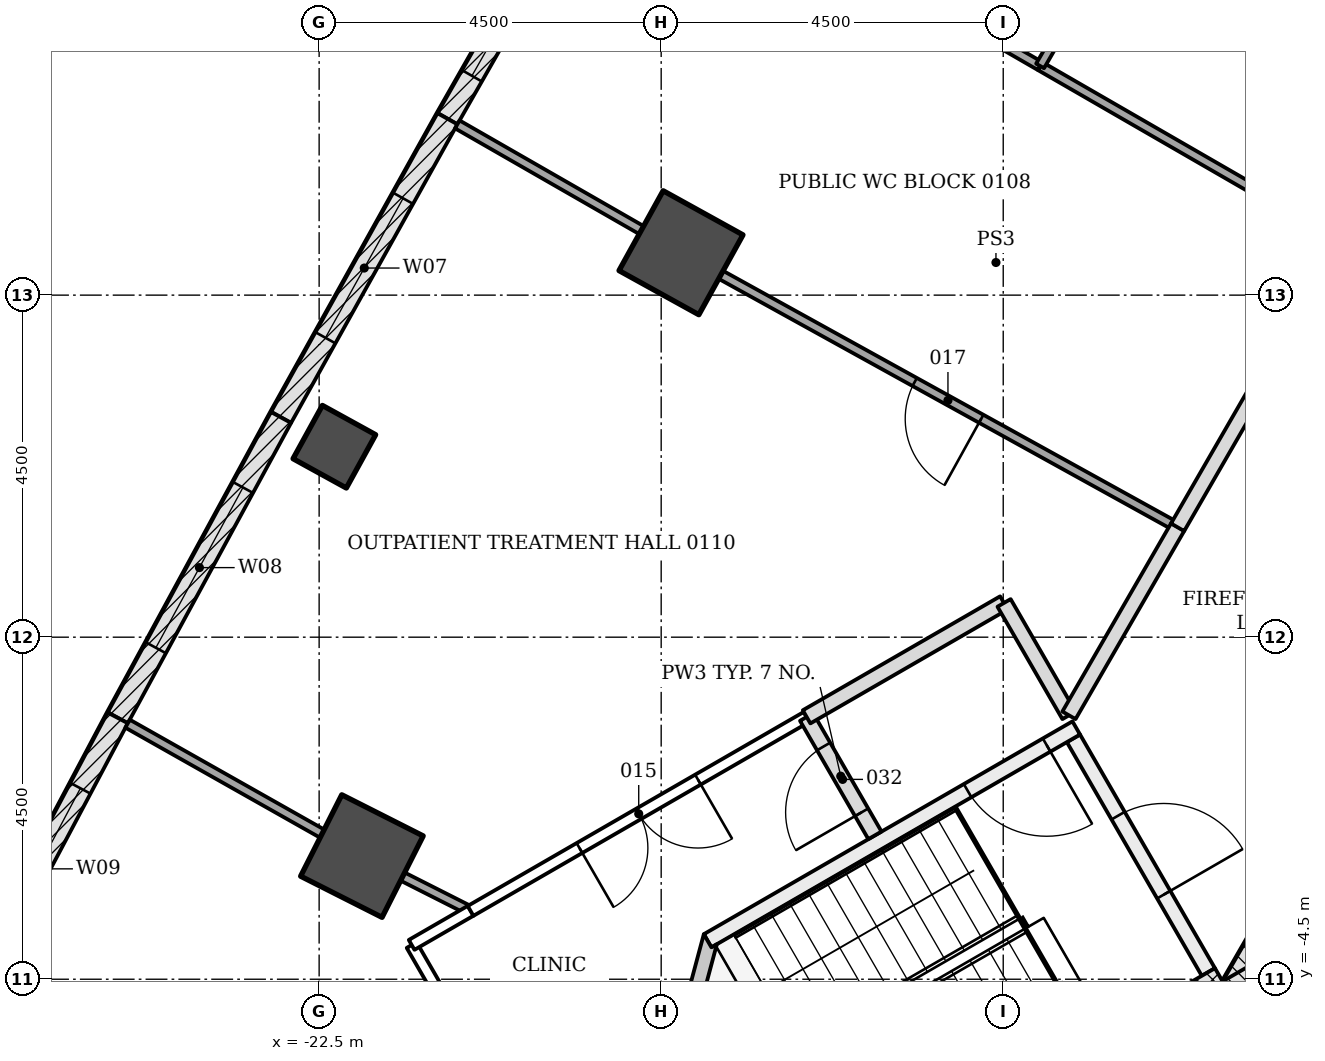
"""IFC4 building model, lengths in metres.
Left out: names, types, materials, properties, quantities, classifications, styles, units other than length and angle.
Written with IfcOpenShell. Run it as: python <this file> out.ifc"""

import sys

from ifc_helpers import new_model, si_unit, direction, frame, frame_2d, origin, origin_2d, place, context, subcontext, project, spatial, polyline, rectangle, outline, extrude, element, fill, save


model = new_model("IFC4")
c1 = context("Model", 3, precision=1e-05, world=origin(), true_north=direction((0.0, 1.0)))
c2 = subcontext(c1, "Body", "Model", "MODEL_VIEW")
j1 = project(units=[si_unit("LENGTHUNIT", "METRE"), si_unit("PLANEANGLEUNIT", "RADIAN")], contexts=[c1])
p1 = place(None, origin())
s1 = spatial("IfcSite", under=j1, at=p1, CompositionType="ELEMENT")
p2 = place(p1, origin())
s2 = spatial("IfcBuilding", under=s1, at=p2, CompositionType="ELEMENT")
p3 = place(p2, frame((0.0, 0.0, 6.0)))
s3 = spatial("IfcBuildingStorey", under=s2, at=p3, CompositionType="ELEMENT", Elevation=6.0)
for number, where, z_axis, x_axis in (
    (1, (-17.739, 5.058, -0.25), (0.0, 0.0, 1.0), (-0.875, 0.484, 0.0)),
    (2, (-21.937, -2.88, -0.25), (0.0, 0.0, 1.0), (-0.893, 0.451, 0.0)),
):
    element("IfcColumn", number, at=place(p3, frame(where, z_axis=z_axis, x_axis=x_axis)), inside=s3, PredefinedType="COLUMN", context=c2, shape_type="SweptSolid", body=[
        extrude(rectangle(XDim=1.2, YDim=1.2, at=origin_2d()), origin(), (0.0, 0.0, 1.0), 4.5),
    ])
p4 = place(p3, frame((-22.3, 2.506, -0.25), z_axis=(0.0, 0.0, 1.0), x_axis=(-0.87611131274, 0.482108875348, 0.0)))
e3 = element("IfcColumn", 3, at=p4, inside=s3, PredefinedType="COLUMN", context=c2, shape_type="SweptSolid", body=[
    extrude(rectangle(XDim=0.8, YDim=0.8, at=origin_2d()), origin(), (0.0, 0.0, 1.0), 4.5),
])
p5 = place(p3, frame((-1.083, 11.281, -0.25), z_axis=(0.0, 0.0, 1.0), x_axis=(-0.500001446645, -0.866024568562, 0.0)))
e4 = element("IfcWall", 4, at=p5, inside=s3, PredefinedType="SHEAR", context=c2, shape_type="SweptSolid", body=[
    extrude(rectangle(XDim=18.458, YDim=0.7, at=frame_2d((9.229, 0.0))), origin(), (0.0, 0.0, 1.0), 4.5),
])
p6 = place(p5, frame((8.979, 0.0, 0.25)))
e5 = element("IfcOpeningElement", 5, at=p6, cuts=e4, PredefinedType="OPENING", context=c2, shape_type="SweptSolid", body=[
    extrude(rectangle(XDim=1.2, YDim=2.1, at=frame_2d((0.6, 1.05))), frame((0.0, 0.36, 0.0), z_axis=(0.0, -1.0, 0.0), x_axis=(1.0, 0.0, 0.0)), (0.0, 0.0, 1.0), 0.72),
])
p7 = place(p5, frame((11.029, 0.0, 0.25)))
e6 = element("IfcOpeningElement", 6, at=p7, cuts=e4, PredefinedType="OPENING", context=c2, shape_type="SweptSolid", body=[
    extrude(rectangle(XDim=1.2, YDim=2.1, at=frame_2d((0.6, 1.05))), frame((0.0, 0.36, 0.0), z_axis=(0.0, -1.0, 0.0), x_axis=(1.0, 0.0, 0.0)), (0.0, 0.0, 1.0), 0.72),
])
p8 = place(p3, frame((-10.311, -4.353, -0.25), z_axis=(0.0, 0.0, 1.0), x_axis=(0.500042739161, -0.866000726912, 0.0)))
e7 = element("IfcWall", 7, at=p8, inside=s3, PredefinedType="SHEAR", context=c2, shape_type="SweptSolid", body=[
    extrude(rectangle(XDim=2.771, YDim=0.7, at=frame_2d((1.386, 0.0))), origin(), (0.0, 0.0, 1.0), 4.5),
])
p9 = place(p3, frame((-20.811, 6.823, 0.0), z_axis=(0.0, 0.0, 1.0), x_axis=(0.495524760411, 0.868593812907, 0.0)))
e8 = element("IfcWall", 8, at=p9, inside=s3, PredefinedType="NOTDEFINED", context=c2, shape_type="SweptSolid", body=[
    extrude(rectangle(XDim=4.496, YDim=0.3, at=frame_2d((2.248, 0.0))), origin(), (0.0, 0.0, 1.0), 4.25),
])
p10 = place(p9, frame((0.648, 0.0, 0.8)))
e9 = element("IfcOpeningElement", 9, at=p10, cuts=e8, PredefinedType="OPENING", context=c2, shape_type="SweptSolid", body=[
    extrude(rectangle(XDim=3.2, YDim=2.7, at=frame_2d((1.6, 1.35))), frame((0.0, 0.16, 0.0), z_axis=(0.0, -1.0, 0.0), x_axis=(1.0, 0.0, 0.0)), (0.0, 0.0, 1.0), 0.32),
])
p11 = place(p3, frame((-23.0, 2.893, 0.0), z_axis=(0.0, 0.0, 1.0), x_axis=(0.486606252415, 0.873621402617, 0.0)))
e10 = element("IfcWall", 10, at=p11, inside=s3, PredefinedType="NOTDEFINED", context=c2, shape_type="SweptSolid", body=[
    extrude(rectangle(XDim=4.496, YDim=0.3, at=frame_2d((2.248, 0.0))), origin(), (0.0, 0.0, 1.0), 4.25),
])
p12 = place(p11, frame((1.198, 0.0, 0.8)))
e11 = element("IfcOpeningElement", 11, at=p12, cuts=e10, PredefinedType="OPENING", context=c2, shape_type="SweptSolid", body=[
    extrude(rectangle(XDim=2.1, YDim=3.0, at=frame_2d((1.05, 1.5))), frame((0.0, 0.16, 0.0), z_axis=(0.0, -1.0, 0.0), x_axis=(1.0, 0.0, 0.0)), (0.0, 0.0, 1.0), 0.32),
])
p13 = place(p3, frame((-25.148, -1.06, 0.0), z_axis=(0.0, 0.0, 1.0), x_axis=(0.477577109439, 0.878589838628, 0.0)))
e12 = element("IfcWall", 12, at=p13, inside=s3, PredefinedType="NOTDEFINED", context=c2, shape_type="SweptSolid", body=[
    extrude(rectangle(XDim=4.496, YDim=0.3, at=frame_2d((2.248, 0.0))), origin(), (0.0, 0.0, 1.0), 4.25),
])
p14 = place(p13, frame((1.048, 0.0, 0.9)))
e13 = element("IfcOpeningElement", 13, at=p14, cuts=e12, PredefinedType="OPENING", context=c2, shape_type="SweptSolid", body=[
    extrude(rectangle(XDim=2.4, YDim=2.4, at=frame_2d((1.2, 1.2))), frame((0.0, 0.16, 0.0), z_axis=(0.0, -1.0, 0.0), x_axis=(1.0, 0.0, 0.0)), (0.0, 0.0, 1.0), 0.32),
])
p15 = place(p3, frame((-27.256, -5.034, 0.0), z_axis=(0.0, 0.0, 1.0), x_axis=(0.468566202388, 0.883428386447, 0.0)))
e14 = element("IfcWall", 14, at=p15, inside=s3, PredefinedType="NOTDEFINED", context=c2, shape_type="SweptSolid", body=[
    extrude(rectangle(XDim=4.496, YDim=0.3, at=frame_2d((2.248, 0.0))), origin(), (0.0, 0.0, 1.0), 4.25),
])
p16 = place(p15, frame((1.048, 0.0, 0.9)))
e15 = element("IfcOpeningElement", 15, at=p16, cuts=e14, PredefinedType="OPENING", context=c2, shape_type="SweptSolid", body=[
    extrude(rectangle(XDim=2.4, YDim=2.4, at=frame_2d((1.2, 1.2))), frame((0.0, 0.16, 0.0), z_axis=(0.0, -1.0, 0.0), x_axis=(1.0, 0.0, 0.0)), (0.0, 0.0, 1.0), 0.32),
])
p17 = place(p3, frame((-12.576, -1.331, -0.25), z_axis=(0.0, 0.0, 1.0), x_axis=(0.499970499736, -0.8660424351, 0.0)))
e16 = element("IfcWall", 16, at=p17, inside=s3, PredefinedType="SHEAR", context=c2, shape_type="SweptSolid", body=[
    extrude(rectangle(XDim=3.55, YDim=0.2, at=frame_2d((1.775, 0.0))), origin(), (0.0, 0.0, 1.0), 4.5),
])
p18 = place(p17, frame((1.175, 0.0, 0.25)))
e17 = element("IfcOpeningElement", 17, at=p18, cuts=e16, PredefinedType="OPENING", context=c2, shape_type="SweptSolid", body=[
    extrude(rectangle(XDim=1.2, YDim=2.1, at=frame_2d((0.6, 1.05))), frame((0.0, 0.11, 0.0), z_axis=(0.0, -1.0, 0.0), x_axis=(1.0, 0.0, 0.0)), (0.0, 0.0, 1.0), 0.22),
])
p19 = place(p3, frame((-12.539, -1.194, -0.25), z_axis=(0.0, 0.0, 1.0), x_axis=(-0.866045472092, -0.499965239061, 0.0)))
e18 = element("IfcWall", 18, at=p19, inside=s3, PredefinedType="SHEAR", context=c2, shape_type="SweptSolid", body=[
    extrude(rectangle(XDim=5.6, YDim=0.2, at=frame_2d((2.8, 0.0))), origin(), (0.0, 0.0, 1.0), 4.5),
])
p20 = place(p19, frame((0.45, 0.0, 0.25)))
e19 = element("IfcOpeningElement", 19, at=p20, cuts=e18, PredefinedType="OPENING", context=c2, shape_type="SweptSolid", body=[
    extrude(rectangle(XDim=1.2, YDim=2.1, at=frame_2d((0.6, 1.05))), frame((0.0, 0.11, 0.0), z_axis=(0.0, -1.0, 0.0), x_axis=(1.0, 0.0, 0.0)), (0.0, 0.0, 1.0), 0.22),
])
p21 = place(p3, frame((-10.43, -4.847, -0.25), z_axis=(0.0, 0.0, 1.0), x_axis=(-0.866018442252, -0.500012057535, 0.0)))
e20 = element("IfcWall", 20, at=p21, inside=s3, PredefinedType="SHEAR", context=c2, shape_type="SweptSolid", body=[
    extrude(rectangle(XDim=7.2, YDim=1.136, at=frame_2d((3.6, 0.0))), origin(), (0.0, 0.0, 1.0), 4.5),
])
p22 = place(p3, frame((0.0, 0.0, -0.25)))
e21 = element("IfcWall", 21, at=p22, inside=s3, PredefinedType="SHEAR", context=c2, shape_type="SweptSolid", body=[
    extrude(outline(polyline([(-17.439, -3.907), (-18.025, -6.093), (-16.95, -7.955), (-16.777, -7.855), (-17.81, -6.065), (-17.267, -4.039), (-17.339, -4.081), (-17.339, -4.081), (-17.339, -4.081), (-17.339, -4.081), (-17.339, -4.081), (-17.339, -4.081), (-17.339, -4.081), (-17.339, -4.081), (-17.339, -4.081), (-17.339, -4.081), (-17.339, -4.081), (-17.339, -4.081), (-17.339, -4.081), (-17.339, -4.081), (-17.339, -4.081), (-17.339, -4.081), (-17.339, -4.081), (-17.439, -3.907)])), origin(), (0.0, 0.0, 1.0), 4.5),
])
p23 = place(p3, frame((-17.941, -9.838, 0.0), z_axis=(0.0, 0.0, 1.0), x_axis=(-0.500048140185, 0.865997608252, 0.0)))
e22 = element("IfcWall", 22, at=p23, inside=s3, PredefinedType="PARTITIONING", context=c2, shape_type="SweptSolid", body=[
    extrude(rectangle(XDim=6.683, YDim=0.15, at=frame_2d((3.342, 0.0))), origin(), (0.0, 0.0, 1.0), 3.638),
])
p24 = place(p23, frame((2.45, 0.0, 0.0)))
e23 = element("IfcOpeningElement", 23, at=p24, cuts=e22, PredefinedType="OPENING", context=c2, shape_type="SweptSolid", body=[
    extrude(rectangle(XDim=1.8, YDim=2.1, at=frame_2d((0.9, 1.05))), frame((0.0, 0.085, 0.0), z_axis=(0.0, -1.0, 0.0), x_axis=(1.0, 0.0, 0.0)), (0.0, 0.0, 1.0), 0.17),
])
p25 = place(p3, frame((-21.283, -4.048, 0.0), z_axis=(0.0, 0.0, 1.0), x_axis=(0.865804825377, 0.500381858538, 0.0)))
e24 = element("IfcWall", 24, at=p25, inside=s3, PredefinedType="PARTITIONING", context=c2, shape_type="SweptSolid", body=[
    extrude(rectangle(XDim=0.897, YDim=0.15, at=frame_2d((0.449, 0.0))), origin(), (0.0, 0.0, 1.0), 3.638),
])
p26 = place(p3, frame((-22.461, -2.584, 0.0), z_axis=(0.0, 0.0, 1.0), x_axis=(-0.870620069476, 0.491955988505, 0.0)))
e25 = element("IfcWall", 25, at=p26, inside=s3, PredefinedType="PARTITIONING", context=c2, shape_type="SweptSolid", body=[
    extrude(rectangle(XDim=2.939, YDim=0.12, at=frame_2d((1.47, 0.0))), origin(), (0.0, 0.0, 1.0), 3.633),
])
p27 = place(p3, frame((-20.509, -3.601, 0.0), z_axis=(0.0, 0.0, 1.0), x_axis=(-0.892316605155, 0.451410097544, 0.0)))
e26 = element("IfcWall", 26, at=p27, inside=s3, PredefinedType="PARTITIONING", context=c2, shape_type="SweptSolid", body=[
    extrude(rectangle(XDim=1.0, YDim=0.12, at=frame_2d((0.5, 0.0))), origin(), (0.0, 0.0, 1.0), 3.638),
])
p28 = place(p3, frame((-16.087, -1.049, 0.0), z_axis=(0.0, 0.0, 1.0), x_axis=(-0.866071706002, -0.49991979363, 0.0)))
e27 = element("IfcWall", 27, at=p28, inside=s3, PredefinedType="PARTITIONING", context=c2, shape_type="SweptSolid", body=[
    extrude(rectangle(XDim=5.105, YDim=0.15, at=frame_2d((2.552, 0.0))), origin(), (0.0, 0.0, 1.0), 3.638),
])
p29 = place(p28, frame((1.65, 0.0, 0.0)))
e28 = element("IfcOpeningElement", 28, at=p29, cuts=e27, PredefinedType="OPENING", context=c2, shape_type="SweptSolid", body=[
    extrude(rectangle(XDim=1.8, YDim=2.1, at=frame_2d((0.9, 1.05))), frame((0.0, 0.085, 0.0), z_axis=(0.0, -1.0, 0.0), x_axis=(1.0, 0.0, 0.0)), (0.0, 0.0, 1.0), 0.17),
])
p30 = place(p3, frame((-15.188, -2.607, 0.0), z_axis=(0.0, 0.0, 1.0), x_axis=(-0.500024172624, 0.866011447264, 0.0)))
e29 = element("IfcWall", 29, at=p30, inside=s3, PredefinedType="PARTITIONING", context=c2, shape_type="SweptSolid", body=[
    extrude(rectangle(XDim=1.798, YDim=0.2, at=frame_2d((0.899, 0.0))), origin(), (0.0, 0.0, 1.0), 3.638),
])
p31 = place(p30, frame((0.35, 0.0, 0.0)))
e30 = element("IfcOpeningElement", 30, at=p31, cuts=e29, PredefinedType="OPENING", context=c2, shape_type="SweptSolid", body=[
    extrude(rectangle(XDim=1.0, YDim=2.1, at=frame_2d((0.5, 1.05))), frame((0.0, 0.11, 0.0), z_axis=(0.0, -1.0, 0.0), x_axis=(1.0, 0.0, 0.0)), (0.0, 0.0, 1.0), 0.22),
])
p32 = place(p3, frame((-16.087, -1.048, 0.0), z_axis=(0.0, 0.0, 1.0), x_axis=(0.865988915629, 0.500063194015, 0.0)))
e31 = element("IfcWall", 31, at=p32, inside=s3, PredefinedType="PARTITIONING", context=c2, shape_type="SweptSolid", body=[
    extrude(rectangle(XDim=2.998, YDim=0.2, at=frame_2d((1.499, 0.0))), origin(), (0.0, 0.0, 1.0), 3.638),
])
p33 = place(p3, frame((-13.489, 0.451, 0.0), z_axis=(0.0, 0.0, 1.0), x_axis=(0.500044178772, -0.865999895656, 0.0)))
e32 = element("IfcWall", 32, at=p33, inside=s3, PredefinedType="PARTITIONING", context=c2, shape_type="SweptSolid", body=[
    extrude(rectangle(XDim=1.708, YDim=0.2, at=frame_2d((0.854, 0.0))), origin(), (0.0, 0.0, 1.0), 4.25),
])
p34 = place(p3, frame((-12.635, -1.028, 0.0), z_axis=(0.0, 0.0, 1.0), x_axis=(0.50005725472, 0.865992345233, 0.0)))
e33 = element("IfcWall", 33, at=p34, inside=s3, PredefinedType="PARTITIONING", context=c2, shape_type="SweptSolid", body=[
    extrude(rectangle(XDim=2.862, YDim=0.2, at=frame_2d((1.431, 0.0))), origin(), (0.0, 0.0, 1.0), 3.638),
])
p35 = place(p3, frame((-18.26, 5.356, 0.0), z_axis=(0.0, 0.0, 1.0), x_axis=(-0.867283853893, 0.49781393791, 0.0)))
e34 = element("IfcWall", 34, at=p35, inside=s3, PredefinedType="PARTITIONING", context=c2, shape_type="SweptSolid", body=[
    extrude(rectangle(XDim=2.792, YDim=0.12, at=frame_2d((1.396, 0.0))), origin(), (0.0, 0.0, 1.0), 3.633),
])
p36 = place(p3, frame((-11.208, 1.446, 0.0), z_axis=(0.0, 0.0, 1.0), x_axis=(-0.875125393946, 0.483896212912, 0.0)))
e35 = element("IfcWall", 35, at=p36, inside=s3, PredefinedType="PARTITIONING", context=c2, shape_type="SweptSolid", body=[
    extrude(rectangle(XDim=6.863, YDim=0.12, at=frame_2d((3.432, 0.0))), origin(), (0.0, 0.0, 1.0), 3.638),
])
p37 = place(p36, frame((2.95, 0.0, 0.0)))
e36 = element("IfcOpeningElement", 36, at=p37, cuts=e35, PredefinedType="OPENING", context=c2, shape_type="SweptSolid", body=[
    extrude(rectangle(XDim=1.0, YDim=2.1, at=frame_2d((0.5, 1.05))), frame((0.0, 0.07, 0.0), z_axis=(0.0, -1.0, 0.0), x_axis=(1.0, 0.0, 0.0)), (0.0, 0.0, 1.0), 0.14),
])
p38 = place(p3, frame((-9.031, 5.213, 0.0), z_axis=(0.0, 0.0, 1.0), x_axis=(-0.500044734646, -0.865999574684, 0.0)))
e37 = element("IfcWall", 37, at=p38, inside=s3, PredefinedType="PARTITIONING", context=c2, shape_type="SweptSolid", body=[
    extrude(rectangle(XDim=4.35, YDim=0.2, at=frame_2d((2.175, 0.0))), origin(), (0.0, 0.0, 1.0), 3.638),
])
p39 = place(p3, frame((-9.032, 5.215, 0.0), z_axis=(0.0, 0.0, 1.0), x_axis=(-0.866130767322, 0.499817460578, 0.0)))
e38 = element("IfcWall", 38, at=p39, inside=s3, PredefinedType="PARTITIONING", context=c2, shape_type="SweptSolid", body=[
    extrude(rectangle(XDim=4.597, YDim=0.12, at=frame_2d((2.299, 0.0))), origin(), (0.0, 0.0, 1.0), 3.638),
])
p40 = place(p3, frame((-13.017, 7.515, 0.0), z_axis=(0.0, 0.0, 1.0), x_axis=(-0.866023771128, 0.500002827834, 0.0)))
e39 = element("IfcWall", 39, at=p40, inside=s3, PredefinedType="PARTITIONING", context=c2, shape_type="SweptSolid", body=[
    extrude(rectangle(XDim=5.226, YDim=0.12, at=frame_2d((2.613, 0.0))), origin(), (0.0, 0.0, 1.0), 3.638),
])
p41 = place(p3, frame((-10.797, 11.355, 0.0), z_axis=(0.0, 0.0, 1.0), x_axis=(-0.500117989508, -0.865957271793, 0.0)))
e40 = element("IfcWall", 40, at=p41, inside=s3, PredefinedType="PARTITIONING", context=c2, shape_type="SweptSolid", body=[
    extrude(rectangle(XDim=4.435, YDim=0.12, at=frame_2d((2.217, 0.0))), origin(), (0.0, 0.0, 1.0), 3.638),
])
p42 = place(p41, frame((1.75, 0.0, 0.0)))
e41 = element("IfcOpeningElement", 41, at=p42, cuts=e40, PredefinedType="OPENING", context=c2, shape_type="SweptSolid", body=[
    extrude(rectangle(XDim=1.0, YDim=2.1, at=frame_2d((0.5, 1.05))), frame((0.0, 0.07, 0.0), z_axis=(0.0, -1.0, 0.0), x_axis=(1.0, 0.0, 0.0)), (0.0, 0.0, 1.0), 0.14),
])
p43 = place(p10, origin())
e42 = element("IfcWindow", 42, at=p43, inside=s3, PartitioningType="TRIPLE_PANEL_VERTICAL", PredefinedType="WINDOW", context=c2, shape_type="SweptSolid", body=[
    extrude(rectangle(XDim=3.2, YDim=2.7, at=frame_2d((1.6, 1.35))), frame((0.0, 0.03, 0.0), z_axis=(0.0, -1.0, 0.0), x_axis=(1.0, 0.0, 0.0)), (0.0, 0.0, 1.0), 0.06),
])
fill(e9, e42)
p44 = place(p12, origin())
e43 = element("IfcWindow", 43, at=p44, inside=s3, PartitioningType="DOUBLE_PANEL_HORIZONTAL", PredefinedType="WINDOW", context=c2, shape_type="SweptSolid", body=[
    extrude(rectangle(XDim=2.1, YDim=3.0, at=frame_2d((1.05, 1.5))), frame((0.0, 0.03, 0.0), z_axis=(0.0, -1.0, 0.0), x_axis=(1.0, 0.0, 0.0)), (0.0, 0.0, 1.0), 0.06),
])
fill(e11, e43)
p45 = place(p14, origin())
e44 = element("IfcWindow", 44, at=p45, inside=s3, PartitioningType="DOUBLE_PANEL_VERTICAL", PredefinedType="WINDOW", context=c2, shape_type="SweptSolid", body=[
    extrude(rectangle(XDim=2.4, YDim=2.4, at=frame_2d((1.2, 1.2))), frame((0.0, 0.03, 0.0), z_axis=(0.0, -1.0, 0.0), x_axis=(1.0, 0.0, 0.0)), (0.0, 0.0, 1.0), 0.06),
])
fill(e13, e44)
p46 = place(p16, origin())
e45 = element("IfcWindow", 45, at=p46, inside=s3, PartitioningType="DOUBLE_PANEL_VERTICAL", PredefinedType="WINDOW", context=c2, shape_type="SweptSolid", body=[
    extrude(rectangle(XDim=2.4, YDim=2.4, at=frame_2d((1.2, 1.2))), frame((0.0, 0.03, 0.0), z_axis=(0.0, -1.0, 0.0), x_axis=(1.0, 0.0, 0.0)), (0.0, 0.0, 1.0), 0.06),
])
fill(e15, e45)
p47 = place(p18, origin())
e46 = element("IfcDoor", 46, at=p47, inside=s3, OperationType="SINGLE_SWING_RIGHT", PredefinedType="DOOR", context=c2, shape_type="SweptSolid", body=[
    extrude(rectangle(XDim=1.2, YDim=2.1, at=frame_2d((0.6, 1.05))), frame((0.0, 0.025, 0.0), z_axis=(0.0, -1.0, 0.0), x_axis=(1.0, 0.0, 0.0)), (0.0, 0.0, 1.0), 0.05),
])
fill(e17, e46)
p48 = place(p20, origin())
e47 = element("IfcDoor", 47, at=p48, inside=s3, OperationType="SINGLE_SWING_LEFT", PredefinedType="DOOR", context=c2, shape_type="SweptSolid", body=[
    extrude(rectangle(XDim=1.2, YDim=2.1, at=frame_2d((0.6, 1.05))), frame((0.0, 0.025, 0.0), z_axis=(0.0, -1.0, 0.0), x_axis=(1.0, 0.0, 0.0)), (0.0, 0.0, 1.0), 0.05),
])
fill(e19, e47)
p49 = place(p29, origin())
e48 = element("IfcDoor", 48, at=p49, inside=s3, OperationType="DOUBLE_DOOR_SINGLE_SWING", PredefinedType="DOOR", context=c2, shape_type="SweptSolid", body=[
    extrude(rectangle(XDim=1.8, YDim=2.1, at=frame_2d((0.9, 1.05))), frame((0.0, 0.025, 0.0), z_axis=(0.0, -1.0, 0.0), x_axis=(1.0, 0.0, 0.0)), (0.0, 0.0, 1.0), 0.05),
])
fill(e28, e48)
p50 = place(p37, origin())
e49 = element("IfcDoor", 49, at=p50, inside=s3, OperationType="SINGLE_SWING_LEFT", PredefinedType="DOOR", context=c2, shape_type="SweptSolid", body=[
    extrude(rectangle(XDim=1.0, YDim=2.1, at=frame_2d((0.5, 1.05))), frame((0.0, 0.025, 0.0), z_axis=(0.0, -1.0, 0.0), x_axis=(1.0, 0.0, 0.0)), (0.0, 0.0, 1.0), 0.05),
])
fill(e36, e49)
p51 = place(p31, origin())
e50 = element("IfcDoor", 50, at=p51, inside=s3, OperationType="SINGLE_SWING_LEFT", PredefinedType="DOOR", context=c2, shape_type="SweptSolid", body=[
    extrude(rectangle(XDim=1.0, YDim=2.1, at=frame_2d((0.5, 1.05))), frame((0.0, 0.025, 0.0), z_axis=(0.0, -1.0, 0.0), x_axis=(1.0, 0.0, 0.0)), (0.0, 0.0, 1.0), 0.05),
])
fill(e30, e50)
save(model, sys.argv[1])
